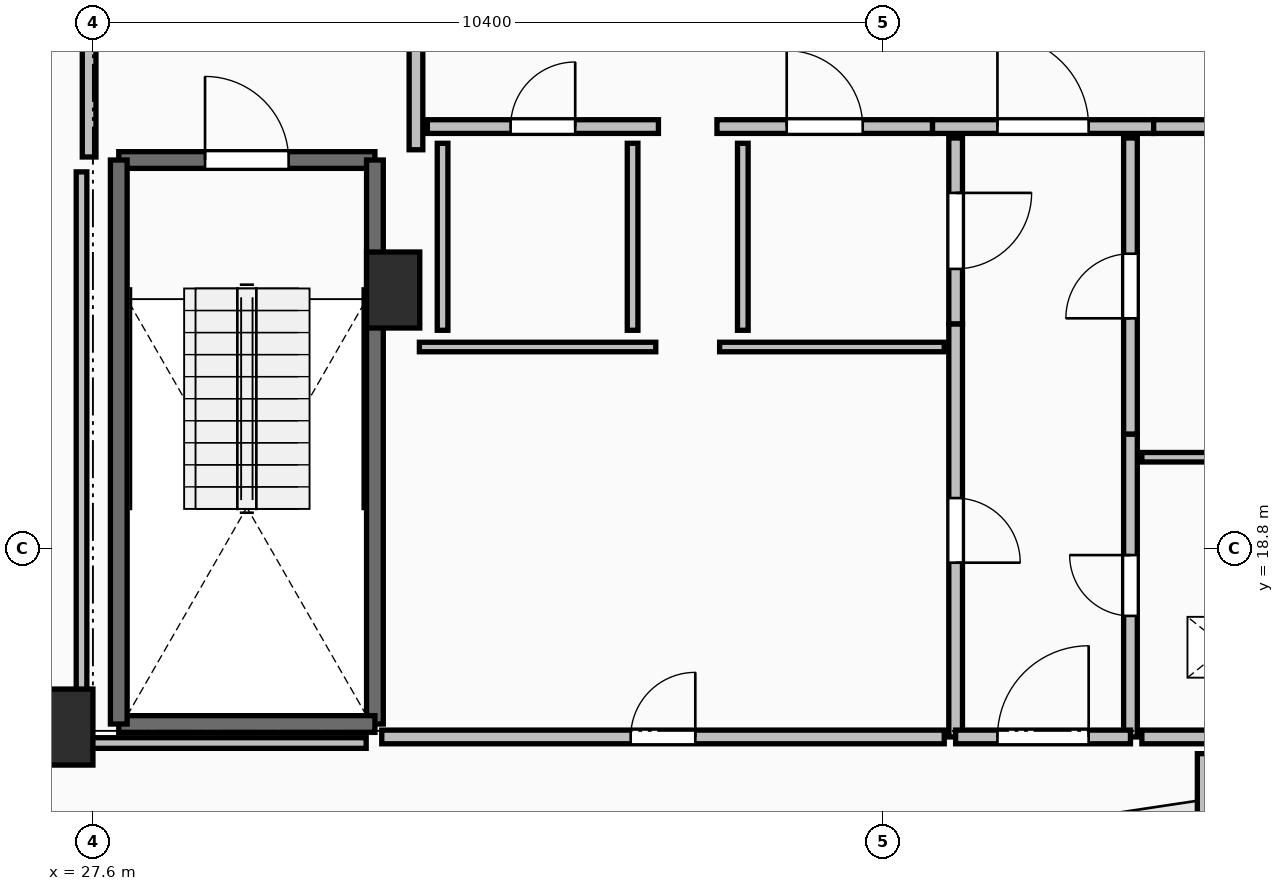
"""IFC4 building model, lengths in metres.
Left out: names, types, materials, properties, quantities, classifications, styles, units other than length and angle.
Written with IfcOpenShell. Run it as: python <this file> out.ifc"""

import sys

from ifc_helpers import new_model, si_unit, direction, frame, frame_2d, origin, origin_2d, place, context, subcontext, project, spatial, rectangle, extrude, element, fill, save


model = new_model("IFC4")
c1 = context("Model", 3, precision=1e-05, world=origin(), true_north=direction((0.0, 1.0)))
c2 = subcontext(c1, "Body", "Model", "MODEL_VIEW")
j1 = project(units=[si_unit("LENGTHUNIT", "METRE"), si_unit("PLANEANGLEUNIT", "RADIAN")], contexts=[c1])
p1 = place(None, origin())
s1 = spatial("IfcSite", under=j1, at=p1, CompositionType="ELEMENT")
p2 = place(p1, origin())
s2 = spatial("IfcBuilding", under=s1, at=p2, CompositionType="ELEMENT")
p3 = place(p2, frame((0.0, 0.0, 241.35)))
s3 = spatial("IfcBuildingStorey", under=s2, at=p3, CompositionType="ELEMENT", Elevation=241.35)
for number, where, z_axis, x_axis in (
    (1, (27.25, 16.45, 0.0), (0.0, 0.0, 1.0), (1.0, 0.0, 0.0)),
    (2, (31.55, 22.2, 0.0), (0.0, 0.0, 1.0), (1.0, 0.0, 0.0)),
):
    element("IfcColumn", number, at=place(p3, frame(where, z_axis=z_axis, x_axis=x_axis)), inside=s3, PredefinedType="PILASTER", context=c2, shape_type="SweptSolid", body=[
        extrude(rectangle(XDim=0.7, YDim=1.0, at=origin_2d()), origin(), (0.0, 0.0, 1.0), 3.55),
    ])
p4 = place(p3, frame((27.94, 23.91, 0.0), z_axis=(0.0, 0.0, 1.0), x_axis=(1.0, 0.0, 0.0)))
e3 = element("IfcWall", 3, at=p4, inside=s3, PredefinedType="SOLIDWALL", context=c2, shape_type="SweptSolid", body=[
    extrude(rectangle(XDim=3.37, YDim=0.22, at=frame_2d((1.685, 0.0))), origin(), (0.0, 0.0, 1.0), 3.29),
])
p5 = place(p4, frame((1.135, 0.0, 0.0)))
e4 = element("IfcOpeningElement", 4, at=p5, cuts=e3, PredefinedType="OPENING", context=c2, shape_type="SweptSolid", body=[
    extrude(rectangle(XDim=1.1, YDim=2.15, at=frame_2d((0.55, 1.075))), frame((0.0, 0.125, 0.0), z_axis=(0.0, -1.0, 0.0), x_axis=(1.0, 0.0, 0.0)), (0.0, 0.0, 1.0), 0.25),
])
p6 = place(p3, frame((31.31, 23.91, 0.0), z_axis=(0.0, 0.0, 1.0), x_axis=(0.0, -1.0, 0.0)))
e5 = element("IfcWall", 5, at=p6, inside=s3, PredefinedType="SOLIDWALL", context=c2, shape_type="SweptSolid", body=[
    extrude(rectangle(XDim=7.42, YDim=0.22, at=frame_2d((3.71, 0.0))), origin(), (0.0, 0.0, 1.0), 3.29),
])
p7 = place(p3, frame((31.31, 16.49, 0.0), z_axis=(0.0, 0.0, 1.0), x_axis=(-1.0, 0.0, 0.0)))
e6 = element("IfcWall", 6, at=p7, inside=s3, PredefinedType="SOLIDWALL", context=c2, shape_type="SweptSolid", body=[
    extrude(rectangle(XDim=3.37, YDim=0.22, at=frame_2d((1.685, 0.0))), origin(), (0.0, 0.0, 1.0), 3.29),
])
p8 = place(p3, frame((27.94, 16.49, 0.0), z_axis=(0.0, 0.0, 1.0), x_axis=(0.0, 1.0, 0.0)))
e7 = element("IfcWall", 7, at=p8, inside=s3, PredefinedType="SOLIDWALL", context=c2, shape_type="SweptSolid", body=[
    extrude(rectangle(XDim=7.42, YDim=0.22, at=frame_2d((3.71, 0.0))), origin(), (0.0, 0.0, 1.0), 3.29),
])
p9 = place(p3, frame((31.85, 24.045, 0.0), z_axis=(0.0, 0.0, 1.0), x_axis=(0.0, 1.0, 0.0)))
e8 = element("IfcWall", 8, at=p9, inside=s3, PredefinedType="PARTITIONING", context=c2, shape_type="SweptSolid", body=[
    extrude(rectangle(XDim=3.91, YDim=0.18, at=frame_2d((1.955, 0.0))), origin(), (0.0, 0.0, 1.0), 3.29),
])
p10 = place(p9, frame((1.355, 0.0, 0.0)))
e9 = element("IfcOpeningElement", 9, at=p10, cuts=e8, PredefinedType="OPENING", context=c2, shape_type="SweptSolid", body=[
    extrude(rectangle(XDim=1.2, YDim=2.15, at=frame_2d((0.6, 1.075))), frame((0.0, 0.105, 0.0), z_axis=(0.0, -1.0, 0.0), x_axis=(1.0, 0.0, 0.0)), (0.0, 0.0, 1.0), 0.21),
])
p11 = place(p3, frame((27.55, 28.0, 0.0), z_axis=(0.0, 0.0, 1.0), x_axis=(0.0, -1.0, 0.0)))
e10 = element("IfcWall", 10, at=p11, inside=s3, PredefinedType="PARTITIONING", context=c2, shape_type="SweptSolid", body=[
    extrude(rectangle(XDim=4.05, YDim=0.18, at=frame_2d((2.025, 0.0))), origin(), (0.0, 0.0, 1.0), 3.29),
])
p12 = place(p11, frame((1.425, 0.0, 0.0)))
e11 = element("IfcOpeningElement", 11, at=p12, cuts=e10, PredefinedType="OPENING", context=c2, shape_type="SweptSolid", body=[
    extrude(rectangle(XDim=1.2, YDim=2.15, at=frame_2d((0.6, 1.075))), frame((0.0, 0.105, 0.0), z_axis=(0.0, -1.0, 0.0), x_axis=(1.0, 0.0, 0.0)), (0.0, 0.0, 1.0), 0.21),
])
p13 = place(p3, frame((38.645, 24.35, 0.0), z_axis=(0.0, 0.0, 1.0), x_axis=(1.0, 0.0, 0.0)))
e12 = element("IfcWall", 12, at=p13, inside=s3, PredefinedType="PARTITIONING", context=c2, shape_type="SweptSolid", body=[
    extrude(rectangle(XDim=2.91, YDim=0.18, at=frame_2d((1.455, 0.0))), origin(), (0.0, 0.0, 1.0), 3.29),
])
p14 = place(p13, frame((0.855, 0.0, 0.0)))
e13 = element("IfcOpeningElement", 13, at=p14, cuts=e12, PredefinedType="OPENING", context=c2, shape_type="SweptSolid", body=[
    extrude(rectangle(XDim=1.2, YDim=2.15, at=frame_2d((0.6, 1.075))), frame((0.0, 0.105, 0.0), z_axis=(0.0, -1.0, 0.0), x_axis=(1.0, 0.0, 0.0)), (0.0, 0.0, 1.0), 0.21),
])
p15 = place(p3, frame((41.555, 24.35, 0.0), z_axis=(0.0, 0.0, 1.0), x_axis=(1.0, 0.0, 0.0)))
e14 = element("IfcWall", 14, at=p15, inside=s3, PredefinedType="PARTITIONING", context=c2, shape_type="SweptSolid", body=[
    extrude(rectangle(XDim=2.445, YDim=0.18, at=frame_2d((1.223, 0.0))), origin(), (0.0, 0.0, 1.0), 3.29),
])
p16 = place(p15, frame((0.798, 0.0, 0.0)))
e15 = element("IfcOpeningElement", 15, at=p16, cuts=e14, PredefinedType="OPENING", context=c2, shape_type="SweptSolid", body=[
    extrude(rectangle(XDim=0.85, YDim=2.1, at=frame_2d((0.425, 1.05))), frame((0.0, 0.105, 0.0), z_axis=(0.0, -1.0, 0.0), x_axis=(1.0, 0.0, 0.0)), (0.0, 0.0, 1.0), 0.21),
])
p17 = place(p3, frame((32.0, 24.35, 0.0), z_axis=(0.0, 0.0, 1.0), x_axis=(1.0, 0.0, 0.0)))
e16 = element("IfcWall", 16, at=p17, inside=s3, PredefinedType="PARTITIONING", context=c2, shape_type="SweptSolid", body=[
    extrude(rectangle(XDim=3.04, YDim=0.18, at=frame_2d((1.52, 0.0))), origin(), (0.0, 0.0, 1.0), 3.29),
])
p18 = place(p17, frame((1.095, 0.0, 0.0)))
e17 = element("IfcOpeningElement", 17, at=p18, cuts=e16, PredefinedType="OPENING", context=c2, shape_type="SweptSolid", body=[
    extrude(rectangle(XDim=0.85, YDim=2.1, at=frame_2d((0.425, 1.05))), frame((0.0, 0.105, 0.0), z_axis=(0.0, -1.0, 0.0), x_axis=(1.0, 0.0, 0.0)), (0.0, 0.0, 1.0), 0.21),
])
p19 = place(p3, frame((35.81, 24.35, 0.0), z_axis=(0.0, 0.0, 1.0), x_axis=(1.0, 0.0, 0.0)))
e18 = element("IfcWall", 18, at=p19, inside=s3, PredefinedType="PARTITIONING", context=c2, shape_type="SweptSolid", body=[
    extrude(rectangle(XDim=2.835, YDim=0.18, at=frame_2d((1.417, 0.0))), origin(), (0.0, 0.0, 1.0), 3.29),
])
p20 = place(p19, frame((0.917, 0.0, 0.0)))
e19 = element("IfcOpeningElement", 19, at=p20, cuts=e18, PredefinedType="OPENING", context=c2, shape_type="SweptSolid", body=[
    extrude(rectangle(XDim=1.0, YDim=2.15, at=frame_2d((0.5, 1.075))), frame((0.0, 0.105, 0.0), z_axis=(0.0, -1.0, 0.0), x_axis=(1.0, 0.0, 0.0)), (0.0, 0.0, 1.0), 0.21),
])
p21 = place(p3, frame((41.25, 16.32, 0.0), z_axis=(0.0, 0.0, 1.0), x_axis=(0.0, 1.0, 0.0)))
e20 = element("IfcWall", 20, at=p21, inside=s3, PredefinedType="PARTITIONING", context=c2, shape_type="SweptSolid", body=[
    extrude(rectangle(XDim=3.985, YDim=0.18, at=frame_2d((1.992, 0.0))), origin(), (0.0, 0.0, 1.0), 3.29),
])
p22 = place(p21, frame((1.593, 0.0, 0.0)))
e21 = element("IfcOpeningElement", 21, at=p22, cuts=e20, PredefinedType="OPENING", context=c2, shape_type="SweptSolid", body=[
    extrude(rectangle(XDim=0.8, YDim=2.05, at=frame_2d((0.4, 1.025))), frame((0.0, 0.105, 0.0), z_axis=(0.0, -1.0, 0.0), x_axis=(1.0, 0.0, 0.0)), (0.0, 0.0, 1.0), 0.21),
])
p23 = place(p3, frame((41.25, 20.305, 0.0), z_axis=(0.0, 0.0, 1.0), x_axis=(0.0, 1.0, 0.0)))
e22 = element("IfcWall", 22, at=p23, inside=s3, PredefinedType="PARTITIONING", context=c2, shape_type="SweptSolid", body=[
    extrude(rectangle(XDim=3.895, YDim=0.18, at=frame_2d((1.948, 0.0))), origin(), (0.0, 0.0, 1.0), 2.482),
])
p24 = place(p23, frame((1.522, 0.0, 0.0)))
e23 = element("IfcOpeningElement", 23, at=p24, cuts=e22, PredefinedType="OPENING", context=c2, shape_type="SweptSolid", body=[
    extrude(rectangle(XDim=0.85, YDim=2.1, at=frame_2d((0.425, 1.05))), frame((0.0, 0.105, 0.0), z_axis=(0.0, -1.0, 0.0), x_axis=(1.0, 0.0, 0.0)), (0.0, 0.0, 1.0), 0.21),
])
p25 = place(p3, frame((38.95, 21.755, 0.0), z_axis=(0.0, 0.0, 1.0), x_axis=(0.0, -1.0, 0.0)))
e24 = element("IfcWall", 24, at=p25, inside=s3, PredefinedType="PARTITIONING", context=c2, shape_type="SweptSolid", body=[
    extrude(rectangle(XDim=5.435, YDim=0.18, at=frame_2d((2.717, 0.0))), origin(), (0.0, 0.0, 1.0), 3.29),
])
p26 = place(p25, frame((2.292, 0.0, 0.0)))
e25 = element("IfcOpeningElement", 25, at=p26, cuts=e24, PredefinedType="OPENING", context=c2, shape_type="SweptSolid", body=[
    extrude(rectangle(XDim=0.85, YDim=2.1, at=frame_2d((0.425, 1.05))), frame((0.0, 0.105, 0.0), z_axis=(0.0, -1.0, 0.0), x_axis=(1.0, 0.0, 0.0)), (0.0, 0.0, 1.0), 0.21),
])
p27 = place(p3, frame((38.95, 24.2, 0.0), z_axis=(0.0, 0.0, 1.0), x_axis=(0.0, -1.0, 0.0)))
e26 = element("IfcWall", 26, at=p27, inside=s3, PredefinedType="PARTITIONING", context=c2, shape_type="SweptSolid", body=[
    extrude(rectangle(XDim=2.445, YDim=0.18, at=frame_2d((1.223, 0.0))), origin(), (0.0, 0.0, 1.0), 2.482),
])
p28 = place(p27, frame((0.722, 0.0, 0.0)))
e27 = element("IfcOpeningElement", 27, at=p28, cuts=e26, PredefinedType="OPENING", context=c2, shape_type="SweptSolid", body=[
    extrude(rectangle(XDim=1.0, YDim=2.15, at=frame_2d((0.5, 1.075))), frame((0.0, 0.105, 0.0), z_axis=(0.0, -1.0, 0.0), x_axis=(1.0, 0.0, 0.0)), (0.0, 0.0, 1.0), 0.21),
])
p29 = place(p3, frame((38.95, 16.32, 0.0), z_axis=(0.0, 0.0, 1.0), x_axis=(1.0, 0.0, 0.0)))
e28 = element("IfcWall", 28, at=p29, inside=s3, PredefinedType="PARTITIONING", context=c2, shape_type="SweptSolid", body=[
    extrude(rectangle(XDim=2.3, YDim=0.18, at=frame_2d((1.15, 0.0))), origin(), (0.0, 0.0, 1.0), 3.29),
])
p30 = place(p29, frame((0.55, 0.0, 0.0)))
e29 = element("IfcOpeningElement", 29, at=p30, cuts=e28, PredefinedType="OPENING", context=c2, shape_type="SweptSolid", body=[
    extrude(rectangle(XDim=1.2, YDim=2.15, at=frame_2d((0.6, 1.075))), frame((0.0, 0.105, 0.0), z_axis=(0.0, -1.0, 0.0), x_axis=(1.0, 0.0, 0.0)), (0.0, 0.0, 1.0), 0.21),
])
p31 = place(p3, frame((44.6, 20.0, 0.0), z_axis=(0.0, 0.0, 1.0), x_axis=(-1.0, 0.0, 0.0)))
e30 = element("IfcWall", 30, at=p31, inside=s3, PredefinedType="PARTITIONING", context=c2, shape_type="SweptSolid", body=[
    extrude(rectangle(XDim=3.2, YDim=0.125, at=frame_2d((1.6, 0.0))), origin(), (0.0, 0.0, 1.0), 3.29),
])
p32 = place(p3, frame((41.4, 16.32, 0.0), z_axis=(0.0, 0.0, 1.0), x_axis=(1.0, 0.0, 0.0)))
e31 = element("IfcWall", 31, at=p32, inside=s3, PredefinedType="PARTITIONING", context=c2, shape_type="SweptSolid", body=[
    extrude(rectangle(XDim=3.2, YDim=0.18, at=frame_2d((1.6, 0.0))), origin(), (0.0, 0.0, 1.0), 3.29),
])
p33 = place(p32, frame((1.2, 0.0, 0.0)))
e32 = element("IfcOpeningElement", 32, at=p33, cuts=e31, PredefinedType="OPENING", context=c2, shape_type="SweptSolid", body=[
    extrude(rectangle(XDim=0.8, YDim=2.05, at=frame_2d((0.4, 1.025))), frame((0.0, 0.105, 0.0), z_axis=(0.0, -1.0, 0.0), x_axis=(1.0, 0.0, 0.0)), (0.0, 0.0, 1.0), 0.21),
])
p34 = place(p3, frame((35.005, 21.45, 0.0), z_axis=(0.0, 0.0, 1.0), x_axis=(-1.0, 0.0, 0.0)))
e33 = element("IfcWall", 33, at=p34, inside=s3, PredefinedType="PARTITIONING", context=c2, shape_type="SweptSolid", body=[
    extrude(rectangle(XDim=3.11, YDim=0.125, at=frame_2d((1.555, 0.0))), origin(), (0.0, 0.0, 1.0), 3.29),
])
p35 = place(p3, frame((38.8, 21.45, 0.0), z_axis=(0.0, 0.0, 1.0), x_axis=(-1.0, 0.0, 0.0)))
e34 = element("IfcWall", 34, at=p35, inside=s3, PredefinedType="PARTITIONING", context=c2, shape_type="SweptSolid", body=[
    extrude(rectangle(XDim=2.955, YDim=0.125, at=frame_2d((1.478, 0.0))), origin(), (0.0, 0.0, 1.0), 3.29),
])
p36 = place(p3, frame((31.4, 16.32, 0.0), z_axis=(0.0, 0.0, 1.0), x_axis=(1.0, 0.0, 0.0)))
e35 = element("IfcWall", 35, at=p36, inside=s3, PredefinedType="PARTITIONING", context=c2, shape_type="SweptSolid", body=[
    extrude(rectangle(XDim=7.4, YDim=0.18, at=frame_2d((3.7, 0.0))), origin(), (0.0, 0.0, 1.0), 3.29),
])
p37 = place(p36, frame((3.275, 0.0, 0.0)))
e36 = element("IfcOpeningElement", 36, at=p37, cuts=e35, PredefinedType="OPENING", context=c2, shape_type="SweptSolid", body=[
    extrude(rectangle(XDim=0.85, YDim=2.1, at=frame_2d((0.425, 1.05))), frame((0.0, 0.105, 0.0), z_axis=(0.0, -1.0, 0.0), x_axis=(1.0, 0.0, 0.0)), (0.0, 0.0, 1.0), 0.21),
])
for number, where, z_axis, x_axis in (
    (37, (32.2, 24.13, 0.0), (0.0, 0.0, 1.0), (0.0, -1.0, 0.0)),
    (38, (34.7, 21.67, 0.0), (0.0, 0.0, 1.0), (0.0, 1.0, 0.0)),
    (39, (36.15, 24.13, 0.0), (0.0, 0.0, 1.0), (0.0, -1.0, 0.0)),
):
    element("IfcWall", number, at=place(p3, frame(where, z_axis=z_axis, x_axis=x_axis)), inside=s3, PredefinedType="PARTITIONING", context=c2, shape_type="SweptSolid", body=[
        extrude(rectangle(XDim=2.46, YDim=0.14, at=frame_2d((1.23, 0.0))), origin(), (0.0, 0.0, 1.0), 2.482),
    ])
p38 = place(p3, frame((27.45, 23.754, 0.0), z_axis=(0.0, 0.0, 1.0), x_axis=(0.0, -1.0, 0.0)))
e40 = element("IfcWall", 40, at=p38, inside=s3, PredefinedType="PARTITIONING", context=c2, shape_type="SweptSolid", body=[
    extrude(rectangle(XDim=7.514, YDim=0.14, at=frame_2d((3.757, 0.0))), origin(), (0.0, 0.0, 1.0), 2.482),
])
p39 = place(p3, frame((27.45, 16.24, 0.0), z_axis=(0.0, 0.0, 1.0), x_axis=(1.0, 0.0, 0.0)))
e41 = element("IfcWall", 41, at=p39, inside=s3, PredefinedType="PARTITIONING", context=c2, shape_type="SweptSolid", body=[
    extrude(rectangle(XDim=3.745, YDim=0.14, at=frame_2d((1.873, 0.0))), origin(), (0.0, 0.0, 1.0), 2.482),
])
p40 = place(p3, frame((42.2, 16.1, 0.0), z_axis=(0.0, 0.0, 1.0), x_axis=(0.0, -1.0, 0.0)))
e42 = element("IfcWall", 42, at=p40, inside=s3, PredefinedType="PARTITIONING", context=c2, shape_type="SweptSolid", body=[
    extrude(rectangle(XDim=1.83, YDim=0.14, at=frame_2d((0.915, 0.0))), origin(), (0.0, 0.0, 1.0), 3.29),
])
p41 = place(p5, origin())
e43 = element("IfcDoor", 43, at=p41, inside=s3, OperationType="SINGLE_SWING_LEFT", PredefinedType="DOOR", context=c2, shape_type="SweptSolid", body=[
    extrude(rectangle(XDim=1.1, YDim=2.15, at=frame_2d((0.55, 1.075))), frame((0.0, 0.025, 0.0), z_axis=(0.0, -1.0, 0.0), x_axis=(1.0, 0.0, 0.0)), (0.0, 0.0, 1.0), 0.05),
])
fill(e4, e43)
p42 = place(p14, origin())
e44 = element("IfcDoor", 44, at=p42, inside=s3, OperationType="SINGLE_SWING_LEFT", PredefinedType="DOOR", context=c2, shape_type="SweptSolid", body=[
    extrude(rectangle(XDim=1.2, YDim=2.15, at=frame_2d((0.6, 1.075))), frame((0.0, 0.025, 0.0), z_axis=(0.0, -1.0, 0.0), x_axis=(1.0, 0.0, 0.0)), (0.0, 0.0, 1.0), 0.05),
])
fill(e13, e44)
p43 = place(p18, origin())
e45 = element("IfcDoor", 45, at=p43, inside=s3, OperationType="SINGLE_SWING_RIGHT", PredefinedType="DOOR", context=c2, shape_type="SweptSolid", body=[
    extrude(rectangle(XDim=0.85, YDim=2.1, at=frame_2d((0.425, 1.05))), frame((0.0, 0.025, 0.0), z_axis=(0.0, -1.0, 0.0), x_axis=(1.0, 0.0, 0.0)), (0.0, 0.0, 1.0), 0.05),
])
fill(e17, e45)
p44 = place(p20, origin())
e46 = element("IfcDoor", 46, at=p44, inside=s3, OperationType="SINGLE_SWING_LEFT", PredefinedType="DOOR", context=c2, shape_type="SweptSolid", body=[
    extrude(rectangle(XDim=1.0, YDim=2.15, at=frame_2d((0.5, 1.075))), frame((0.0, 0.025, 0.0), z_axis=(0.0, -1.0, 0.0), x_axis=(1.0, 0.0, 0.0)), (0.0, 0.0, 1.0), 0.05),
])
fill(e19, e46)
p45 = place(p22, origin())
e47 = element("IfcDoor", 47, at=p45, inside=s3, OperationType="SINGLE_SWING_RIGHT", PredefinedType="DOOR", context=c2, shape_type="SweptSolid", body=[
    extrude(rectangle(XDim=0.8, YDim=2.05, at=frame_2d((0.4, 1.025))), frame((0.0, 0.025, 0.0), z_axis=(0.0, -1.0, 0.0), x_axis=(1.0, 0.0, 0.0)), (0.0, 0.0, 1.0), 0.05),
])
fill(e21, e47)
p46 = place(p24, origin())
e48 = element("IfcDoor", 48, at=p46, inside=s3, OperationType="SINGLE_SWING_LEFT", PredefinedType="DOOR", context=c2, shape_type="SweptSolid", body=[
    extrude(rectangle(XDim=0.85, YDim=2.1, at=frame_2d((0.425, 1.05))), frame((0.0, 0.025, 0.0), z_axis=(0.0, -1.0, 0.0), x_axis=(1.0, 0.0, 0.0)), (0.0, 0.0, 1.0), 0.05),
])
fill(e23, e48)
p47 = place(p26, origin())
e49 = element("IfcDoor", 49, at=p47, inside=s3, OperationType="SINGLE_SWING_RIGHT", PredefinedType="DOOR", context=c2, shape_type="SweptSolid", body=[
    extrude(rectangle(XDim=0.85, YDim=2.1, at=frame_2d((0.425, 1.05))), frame((0.0, 0.025, 0.0), z_axis=(0.0, -1.0, 0.0), x_axis=(1.0, 0.0, 0.0)), (0.0, 0.0, 1.0), 0.05),
])
fill(e25, e49)
p48 = place(p28, origin())
e50 = element("IfcDoor", 50, at=p48, inside=s3, OperationType="SINGLE_SWING_LEFT", PredefinedType="DOOR", context=c2, shape_type="SweptSolid", body=[
    extrude(rectangle(XDim=1.0, YDim=2.15, at=frame_2d((0.5, 1.075))), frame((0.0, 0.025, 0.0), z_axis=(0.0, -1.0, 0.0), x_axis=(1.0, 0.0, 0.0)), (0.0, 0.0, 1.0), 0.05),
])
fill(e27, e50)
p49 = place(p30, origin())
e51 = element("IfcDoor", 51, at=p49, inside=s3, OperationType="SINGLE_SWING_RIGHT", PredefinedType="DOOR", context=c2, shape_type="SweptSolid", body=[
    extrude(rectangle(XDim=1.2, YDim=2.15, at=frame_2d((0.6, 1.075))), frame((0.0, 0.025, 0.0), z_axis=(0.0, -1.0, 0.0), x_axis=(1.0, 0.0, 0.0)), (0.0, 0.0, 1.0), 0.05),
])
fill(e29, e51)
p50 = place(p37, origin())
e52 = element("IfcDoor", 52, at=p50, inside=s3, OperationType="SINGLE_SWING_RIGHT", PredefinedType="DOOR", context=c2, shape_type="SweptSolid", body=[
    extrude(rectangle(XDim=0.85, YDim=2.1, at=frame_2d((0.425, 1.05))), frame((0.0, 0.025, 0.0), z_axis=(0.0, -1.0, 0.0), x_axis=(1.0, 0.0, 0.0)), (0.0, 0.0, 1.0), 0.05),
])
fill(e36, e52)
save(model, sys.argv[1])
